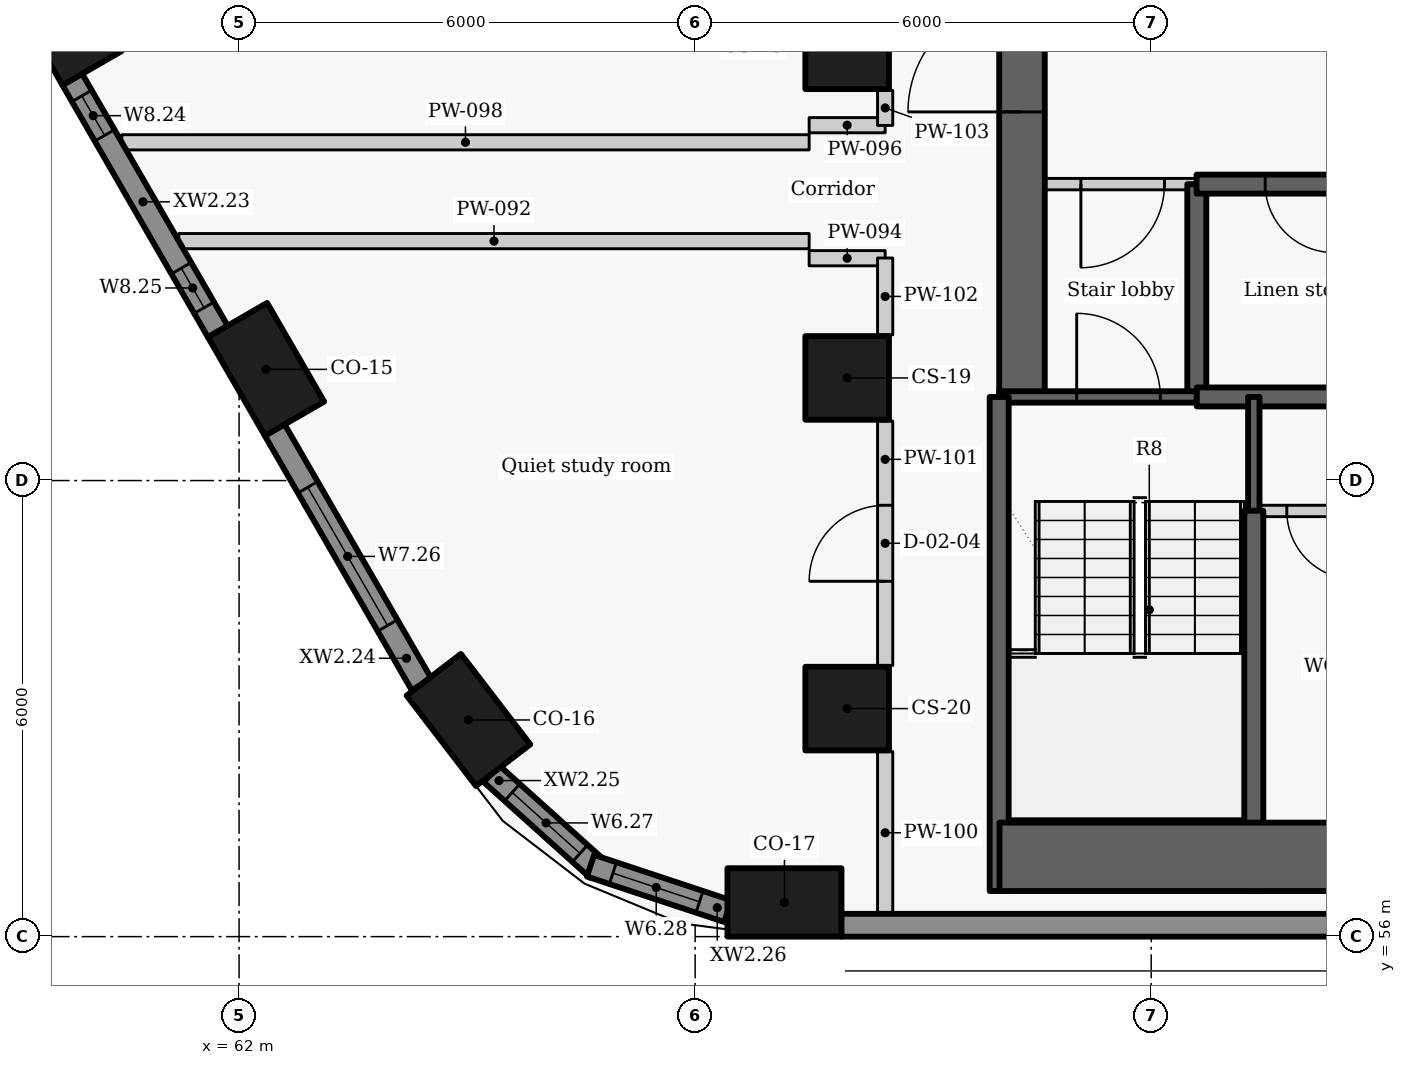
"""IFC4 building model, lengths in metres.
Left out: names, types, materials, properties, quantities, classifications, styles, units other than length and angle.
Written with IfcOpenShell. Run it as: python <this file> out.ifc"""

import sys

from ifc_helpers import new_model, si_unit, direction, frame, frame_2d, origin, origin_2d, place, context, subcontext, project, spatial, rectangle, extrude, element, fill, save


model = new_model("IFC4")
c1 = context("Model", 3, precision=1e-05, world=origin(), true_north=direction((0.0, 1.0)))
c2 = subcontext(c1, "Body", "Model", "MODEL_VIEW")
j1 = project(units=[si_unit("LENGTHUNIT", "METRE"), si_unit("PLANEANGLEUNIT", "RADIAN")], contexts=[c1])
p1 = place(None, origin())
s1 = spatial("IfcSite", under=j1, at=p1, CompositionType="ELEMENT")
p2 = place(p1, origin())
s2 = spatial("IfcBuilding", under=s1, at=p2, CompositionType="ELEMENT")
p3 = place(p2, frame((0.0, 0.0, 61.2)))
s3 = spatial("IfcBuildingStorey", under=s2, at=p3, CompositionType="ELEMENT", Elevation=61.2)
for number, where, z_axis, x_axis in (
    (1, (59.692, 68.075, 0.0), (0.0, 0.0, 1.0), (0.5, -0.866, 0.0)),
    (2, (62.354, 63.463, 0.0), (0.0, 0.0, 1.0), (0.5, -0.866, 0.0)),
    (3, (65.018, 58.851, 0.0), (0.0, 0.0, 1.0), (0.609, -0.793, 0.0)),
    (4, (69.175, 56.45, 0.0), (0.0, 0.0, 1.0), (1.0, 0.0, 0.0)),
):
    element("IfcColumn", number, at=place(p3, frame(where, z_axis=z_axis, x_axis=x_axis)), inside=s3, PredefinedType="COLUMN", context=c2, shape_type="SweptSolid", body=[
        extrude(rectangle(XDim=1.5, YDim=0.9, at=origin_2d()), origin(), (0.0, 0.0, 1.0), 3.3),
    ])
for number, where, z_axis, x_axis in (
    (5, (70.0, 67.7, 0.0), (0.0, 0.0, 1.0), (0.0, -1.0, 0.0)),
    (6, (70.0, 63.35, 0.0), (0.0, 0.0, 1.0), (0.0, -1.0, 0.0)),
    (7, (70.0, 59.0, 0.0), (0.0, 0.0, 1.0), (0.0, -1.0, 0.0)),
):
    element("IfcColumn", number, at=place(p3, frame(where, z_axis=z_axis, x_axis=x_axis)), inside=s3, PredefinedType="COLUMN", context=c2, shape_type="SweptSolid", body=[
        extrude(rectangle(XDim=1.1, YDim=1.1, at=origin_2d()), origin(), (0.0, 0.0, 1.0), 3.3),
    ])
p4 = place(p3, frame((59.805, 67.279, 0.0), z_axis=(0.0, 0.0, 1.0), x_axis=(0.500001735503, -0.866024401789, 0.0)))
e8 = element("IfcWall", 8, at=p4, inside=s3, PredefinedType="SOLIDWALL", context=c2, shape_type="SweptSolid", body=[
    extrude(rectangle(XDim=3.834, YDim=0.3, at=frame_2d((1.917, 0.0))), origin(), (0.0, 0.0, 1.0), 2.425),
])
p5 = place(p4, frame((0.253, 0.0, 0.9)))
e9 = element("IfcOpeningElement", 9, at=p5, cuts=e8, PredefinedType="OPENING", context=c2, shape_type="SweptSolid", body=[
    extrude(rectangle(XDim=0.6, YDim=1.1, at=frame_2d((0.3, 0.55))), frame((0.0, 0.16, 0.0), z_axis=(0.0, -1.0, 0.0), x_axis=(1.0, 0.0, 0.0)), (0.0, 0.0, 1.0), 0.32),
])
p6 = place(p4, frame((2.87, 0.0, 0.9)))
e10 = element("IfcOpeningElement", 10, at=p6, cuts=e8, PredefinedType="OPENING", context=c2, shape_type="SweptSolid", body=[
    extrude(rectangle(XDim=0.6, YDim=1.1, at=frame_2d((0.3, 0.55))), frame((0.0, 0.16, 0.0), z_axis=(0.0, -1.0, 0.0), x_axis=(1.0, 0.0, 0.0)), (0.0, 0.0, 1.0), 0.32),
])
p7 = place(p3, frame((62.468, 62.667, 0.0), z_axis=(0.0, 0.0, 1.0), x_axis=(0.499948341072, -0.866055227026, 0.0)))
e11 = element("IfcWall", 11, at=p7, inside=s3, PredefinedType="SOLIDWALL", context=c2, shape_type="SweptSolid", body=[
    extrude(rectangle(XDim=3.867, YDim=0.3, at=frame_2d((1.934, 0.0))), origin(), (0.0, 0.0, 1.0), 2.425),
])
p8 = place(p7, frame((0.872, 0.0, 0.9)))
e12 = element("IfcOpeningElement", 12, at=p8, cuts=e11, PredefinedType="OPENING", context=c2, shape_type="SweptSolid", body=[
    extrude(rectangle(XDim=2.1, YDim=1.1, at=frame_2d((1.05, 0.55))), frame((0.0, 0.16, 0.0), z_axis=(0.0, -1.0, 0.0), x_axis=(1.0, 0.0, 0.0)), (0.0, 0.0, 1.0), 0.32),
])
p9 = place(p3, frame((65.32, 58.143, 0.0), z_axis=(0.0, 0.0, 1.0), x_axis=(0.7435526378, -0.668677407141, 0.0)))
e13 = element("IfcWall", 13, at=p9, inside=s3, PredefinedType="SOLIDWALL", context=c2, shape_type="SweptSolid", body=[
    extrude(rectangle(XDim=1.878, YDim=0.3, at=frame_2d((0.939, 0.0))), origin(), (0.0, 0.0, 1.0), 2.425),
])
p10 = place(p9, frame((0.367, 0.0, 0.9)))
e14 = element("IfcOpeningElement", 14, at=p10, cuts=e13, PredefinedType="OPENING", context=c2, shape_type="SweptSolid", body=[
    extrude(rectangle(XDim=1.2, YDim=1.1, at=frame_2d((0.6, 0.55))), frame((0.0, 0.16, 0.0), z_axis=(0.0, -1.0, 0.0), x_axis=(1.0, 0.0, 0.0)), (0.0, 0.0, 1.0), 0.32),
])
p11 = place(p3, frame((66.624, 56.933, 0.0), z_axis=(0.0, 0.0, 1.0), x_axis=(0.949246659442, -0.314532636683, 0.0)))
e15 = element("IfcWall", 15, at=p11, inside=s3, PredefinedType="SOLIDWALL", context=c2, shape_type="SweptSolid", body=[
    extrude(rectangle(XDim=1.902, YDim=0.3, at=frame_2d((0.951, 0.0))), origin(), (0.0, 0.0, 1.0), 2.425),
])
p12 = place(p11, frame((0.31, 0.0, 0.9)))
e16 = element("IfcOpeningElement", 16, at=p12, cuts=e15, PredefinedType="OPENING", context=c2, shape_type="SweptSolid", body=[
    extrude(rectangle(XDim=1.2, YDim=1.1, at=frame_2d((0.6, 0.55))), frame((0.0, 0.16, 0.0), z_axis=(0.0, -1.0, 0.0), x_axis=(1.0, 0.0, 0.0)), (0.0, 0.0, 1.0), 0.32),
])
p13 = place(p3, frame((69.921, 56.15, 0.0), z_axis=(0.0, 0.0, 1.0), x_axis=(1.0, 0.0, 0.0)))
e17 = element("IfcWall", 17, at=p13, inside=s3, PredefinedType="SOLIDWALL", context=c2, shape_type="SweptSolid", body=[
    extrude(rectangle(XDim=19.84, YDim=0.3, at=frame_2d((9.92, 0.0))), origin(), (0.0, 0.0, 1.0), 2.425),
])
p14 = place(p3, frame((74.6, 63.1, -0.275), z_axis=(0.0, 0.0, 1.0), x_axis=(0.0, 1.0, 0.0)))
e18 = element("IfcWall", 18, at=p14, inside=s3, PredefinedType="SHEAR", context=c2, shape_type="SweptSolid", body=[
    extrude(rectangle(XDim=2.8, YDim=0.25, at=frame_2d((1.4, 0.0))), origin(), (0.0, 0.0, 1.0), 3.3),
])
p15 = place(p3, frame((72.3, 63.1, -0.275), z_axis=(0.0, 0.0, 1.0), x_axis=(0.0, 1.0, 0.0)))
e19 = element("IfcWall", 19, at=p15, inside=s3, PredefinedType="SHEAR", context=c2, shape_type="SweptSolid", body=[
    extrude(rectangle(XDim=9.1, YDim=0.6, at=frame_2d((4.55, 0.0))), origin(), (0.0, 0.0, 1.0), 3.3),
])
p16 = place(p15, frame((3.75, 0.0, 0.275)))
e20 = element("IfcOpeningElement", 20, at=p16, cuts=e19, PredefinedType="OPENING", context=c2, shape_type="SweptSolid", body=[
    extrude(rectangle(XDim=1.5, YDim=2.1, at=frame_2d((0.75, 1.05))), frame((0.0, 0.31, 0.0), z_axis=(0.0, -1.0, 0.0), x_axis=(1.0, 0.0, 0.0)), (0.0, 0.0, 1.0), 0.62),
])
p17 = place(p3, frame((74.603, 65.9, 0.0), z_axis=(0.0, 0.0, 1.0), x_axis=(-1.0, 0.0, 0.0)))
e21 = element("IfcWall", 21, at=p17, inside=s3, PredefinedType="PARTITIONING", context=c2, shape_type="SweptSolid", body=[
    extrude(rectangle(XDim=2.603, YDim=0.15, at=frame_2d((1.302, 0.0))), origin(), (0.0, 0.0, 1.0), 3.025),
])
p18 = place(p17, frame((0.428, 0.0, 0.0)))
e22 = element("IfcOpeningElement", 22, at=p18, cuts=e21, PredefinedType="OPENING", context=c2, shape_type="SweptSolid", body=[
    extrude(rectangle(XDim=1.1, YDim=2.1, at=frame_2d((0.55, 1.05))), frame((0.0, 0.085, 0.0), z_axis=(0.0, -1.0, 0.0), x_axis=(1.0, 0.0, 0.0)), (0.0, 0.0, 1.0), 0.17),
])
p19 = place(p3, frame((77.303, 65.9, -0.275), z_axis=(0.0, 0.0, 1.0), x_axis=(-1.0, 0.0, 0.0)))
e23 = element("IfcWall", 23, at=p19, inside=s3, PredefinedType="SHEAR", context=c2, shape_type="SweptSolid", body=[
    extrude(rectangle(XDim=2.706, YDim=0.25, at=frame_2d((1.353, 0.0))), origin(), (0.0, 0.0, 1.0), 3.3),
])
p20 = place(p19, frame((0.903, 0.0, 0.275)))
e24 = element("IfcOpeningElement", 24, at=p20, cuts=e23, PredefinedType="OPENING", context=c2, shape_type="SweptSolid", body=[
    extrude(rectangle(XDim=0.9, YDim=2.1, at=frame_2d((0.45, 1.05))), frame((0.0, 0.135, 0.0), z_axis=(0.0, -1.0, 0.0), x_axis=(1.0, 0.0, 0.0)), (0.0, 0.0, 1.0), 0.27),
])
p21 = place(p3, frame((72.0, 63.1, -0.275), z_axis=(0.0, 0.0, 1.0), x_axis=(1.0, 0.0, 0.0)))
e25 = element("IfcWall", 25, at=p21, inside=s3, PredefinedType="SHEAR", context=c2, shape_type="SweptSolid", body=[
    extrude(rectangle(XDim=2.6, YDim=0.15, at=frame_2d((1.3, 0.0))), origin(), (0.0, 0.0, 1.0), 3.3),
])
p22 = place(p21, frame((1.02, 0.0, 0.275)))
e26 = element("IfcOpeningElement", 26, at=p22, cuts=e25, PredefinedType="OPENING", context=c2, shape_type="SweptSolid", body=[
    extrude(rectangle(XDim=1.1, YDim=2.1, at=frame_2d((0.55, 1.05))), frame((0.0, 0.085, 0.0), z_axis=(0.0, -1.0, 0.0), x_axis=(1.0, 0.0, 0.0)), (0.0, 0.0, 1.0), 0.17),
])
p23 = place(p3, frame((74.6, 63.1, -0.275), z_axis=(0.0, 0.0, 1.0), x_axis=(1.0, 0.0, 0.0)))
e27 = element("IfcWall", 27, at=p23, inside=s3, PredefinedType="SHEAR", context=c2, shape_type="SweptSolid", body=[
    extrude(rectangle(XDim=2.7, YDim=0.25, at=frame_2d((1.35, 0.0))), origin(), (0.0, 0.0, 1.0), 3.3),
])
p24 = place(p3, frame((75.35, 61.597, -0.275), z_axis=(0.0, 0.0, 1.0), x_axis=(0.0, 1.0, 0.0)))
e28 = element("IfcWall", 28, at=p24, inside=s3, PredefinedType="SHEAR", context=c2, shape_type="SweptSolid", body=[
    extrude(rectangle(XDim=1.503, YDim=0.15, at=frame_2d((0.751, 0.0))), origin(), (0.0, 0.0, 1.0), 3.3),
])
p25 = place(p3, frame((75.35, 56.6, -0.275), z_axis=(0.0, 0.0, 1.0), x_axis=(0.0, 1.0, 0.0)))
e29 = element("IfcWall", 29, at=p25, inside=s3, PredefinedType="SHEAR", context=c2, shape_type="SweptSolid", body=[
    extrude(rectangle(XDim=5.003, YDim=0.25, at=frame_2d((2.501, 0.0))), origin(), (0.0, 0.0, 1.0), 3.3),
])
p26 = place(p3, frame((72.0, 56.6, -0.275), z_axis=(0.0, 0.0, 1.0), x_axis=(0.0, 1.0, 0.0)))
e30 = element("IfcWall", 30, at=p26, inside=s3, PredefinedType="SHEAR", context=c2, shape_type="SweptSolid", body=[
    extrude(rectangle(XDim=6.5, YDim=0.25, at=frame_2d((3.25, 0.0))), origin(), (0.0, 0.0, 1.0), 3.3),
])
p27 = place(p3, frame((80.55, 61.6, 0.0), z_axis=(0.0, 0.0, 1.0), x_axis=(-1.0, 0.0, 0.0)))
e31 = element("IfcWall", 31, at=p27, inside=s3, PredefinedType="PARTITIONING", context=c2, shape_type="SweptSolid", body=[
    extrude(rectangle(XDim=5.2, YDim=0.15, at=frame_2d((2.6, 0.0))), origin(), (0.0, 0.0, 1.0), 3.025),
])
p28 = place(p27, frame((3.866, 0.0, 0.0)))
e32 = element("IfcOpeningElement", 32, at=p28, cuts=e31, PredefinedType="OPENING", context=c2, shape_type="SweptSolid", body=[
    extrude(rectangle(XDim=0.9, YDim=2.1, at=frame_2d((0.45, 1.05))), frame((0.0, 0.085, 0.0), z_axis=(0.0, -1.0, 0.0), x_axis=(1.0, 0.0, 0.0)), (0.0, 0.0, 1.0), 0.17),
])
p29 = place(p27, frame((2.124, 0.0, 0.0)))
e33 = element("IfcOpeningElement", 33, at=p29, cuts=e31, PredefinedType="OPENING", context=c2, shape_type="SweptSolid", body=[
    extrude(rectangle(XDim=0.9, YDim=2.1, at=frame_2d((0.45, 1.05))), frame((0.0, 0.085, 0.0), z_axis=(0.0, -1.0, 0.0), x_axis=(1.0, 0.0, 0.0)), (0.0, 0.0, 1.0), 0.17),
])
p30 = place(p27, frame((0.408, 0.0, 0.0)))
e34 = element("IfcOpeningElement", 34, at=p30, cuts=e31, PredefinedType="OPENING", context=c2, shape_type="SweptSolid", body=[
    extrude(rectangle(XDim=0.9, YDim=2.1, at=frame_2d((0.45, 1.05))), frame((0.0, 0.085, 0.0), z_axis=(0.0, -1.0, 0.0), x_axis=(1.0, 0.0, 0.0)), (0.0, 0.0, 1.0), 0.17),
])
p31 = place(p3, frame((61.207, 65.15, 0.0), z_axis=(0.0, 0.0, 1.0), x_axis=(1.0, 0.0, 0.0)))
e35 = element("IfcWall", 35, at=p31, inside=s3, PredefinedType="PARTITIONING", context=c2, shape_type="SweptSolid", body=[
    extrude(rectangle(XDim=8.293, YDim=0.2, at=frame_2d((4.146, 0.0))), origin(), (0.0, 0.0, 1.0), 2.405),
])
for number, where, z_axis, x_axis in (
    (36, (69.5, 64.925, 0.0), (0.0, 0.0, 1.0), (1.0, 0.0, 0.0)),
    (37, (69.5, 66.675, 0.0), (0.0, 0.0, 1.0), (1.0, 0.0, 0.0)),
):
    element("IfcWall", number, at=place(p3, frame(where, z_axis=z_axis, x_axis=x_axis)), inside=s3, PredefinedType="PARTITIONING", context=c2, shape_type="SweptSolid", body=[
        extrude(rectangle(XDim=1.0, YDim=0.2, at=frame_2d((0.5, 0.0))), origin(), (0.0, 0.0, 1.0), 2.505),
    ])
p32 = place(p3, frame((60.457, 66.45, 0.0), z_axis=(0.0, 0.0, 1.0), x_axis=(1.0, 0.0, 0.0)))
e38 = element("IfcWall", 38, at=p32, inside=s3, PredefinedType="PARTITIONING", context=c2, shape_type="SweptSolid", body=[
    extrude(rectangle(XDim=9.043, YDim=0.2, at=frame_2d((4.521, 0.0))), origin(), (0.0, 0.0, 1.0), 2.405),
])
p33 = place(p3, frame((70.5, 56.3, 0.0), z_axis=(0.0, 0.0, 1.0), x_axis=(0.0, 1.0, 0.0)))
e39 = element("IfcWall", 39, at=p33, inside=s3, PredefinedType="PARTITIONING", context=c2, shape_type="SweptSolid", body=[
    extrude(rectangle(XDim=2.133, YDim=0.2, at=frame_2d((1.066, 0.0))), origin(), (0.0, 0.0, 1.0), 3.025),
])
p34 = place(p3, frame((70.5, 59.567, 0.0), z_axis=(0.0, 0.0, 1.0), x_axis=(0.0, 1.0, 0.0)))
e40 = element("IfcWall", 40, at=p34, inside=s3, PredefinedType="PARTITIONING", context=c2, shape_type="SweptSolid", body=[
    extrude(rectangle(XDim=3.216, YDim=0.2, at=frame_2d((1.608, 0.0))), origin(), (0.0, 0.0, 1.0), 3.025),
])
p35 = place(p34, frame((1.108, 0.0, 0.0)))
e41 = element("IfcOpeningElement", 41, at=p35, cuts=e40, PredefinedType="OPENING", context=c2, shape_type="SweptSolid", body=[
    extrude(rectangle(XDim=1.0, YDim=2.1, at=frame_2d((0.5, 1.05))), frame((0.0, 0.11, 0.0), z_axis=(0.0, -1.0, 0.0), x_axis=(1.0, 0.0, 0.0)), (0.0, 0.0, 1.0), 0.22),
])
p36 = place(p3, frame((70.5, 63.917, 0.0), z_axis=(0.0, 0.0, 1.0), x_axis=(0.0, 1.0, 0.0)))
e42 = element("IfcWall", 42, at=p36, inside=s3, PredefinedType="PARTITIONING", context=c2, shape_type="SweptSolid", body=[
    extrude(rectangle(XDim=1.011, YDim=0.2, at=frame_2d((0.505, 0.0))), origin(), (0.0, 0.0, 1.0), 3.025),
])
p37 = place(p3, frame((70.5, 66.672, 0.0), z_axis=(0.0, 0.0, 1.0), x_axis=(0.0, 1.0, 0.0)))
e43 = element("IfcWall", 43, at=p37, inside=s3, PredefinedType="PARTITIONING", context=c2, shape_type="SweptSolid", body=[
    extrude(rectangle(XDim=0.461, YDim=0.2, at=frame_2d((0.23, 0.0))), origin(), (0.0, 0.0, 1.0), 3.025),
])
p38 = place(p3, frame((72.004, 57.05, -0.275), z_axis=(0.0, 0.0, 1.0), x_axis=(1.0, 0.0, 0.0)))
e44 = element("IfcWall", 44, at=p38, inside=s3, PredefinedType="SHEAR", context=c2, shape_type="SweptSolid", body=[
    extrude(rectangle(XDim=15.992, YDim=0.9, at=frame_2d((7.996, 0.0))), origin(), (0.0, 0.0, 1.0), 3.3),
])
p39 = place(p5, origin())
e45 = element("IfcWindow", 45, at=p39, inside=s3, PartitioningType="SINGLE_PANEL", PredefinedType="WINDOW", context=c2, shape_type="SweptSolid", body=[
    extrude(rectangle(XDim=0.6, YDim=1.1, at=frame_2d((0.3, 0.55))), frame((0.0, 0.03, 0.0), z_axis=(0.0, -1.0, 0.0), x_axis=(1.0, 0.0, 0.0)), (0.0, 0.0, 1.0), 0.06),
])
fill(e9, e45)
p40 = place(p6, origin())
e46 = element("IfcWindow", 46, at=p40, inside=s3, PartitioningType="SINGLE_PANEL", PredefinedType="WINDOW", context=c2, shape_type="SweptSolid", body=[
    extrude(rectangle(XDim=0.6, YDim=1.1, at=frame_2d((0.3, 0.55))), frame((0.0, 0.03, 0.0), z_axis=(0.0, -1.0, 0.0), x_axis=(1.0, 0.0, 0.0)), (0.0, 0.0, 1.0), 0.06),
])
fill(e10, e46)
p41 = place(p8, origin())
e47 = element("IfcWindow", 47, at=p41, inside=s3, PartitioningType="SINGLE_PANEL", PredefinedType="WINDOW", context=c2, shape_type="SweptSolid", body=[
    extrude(rectangle(XDim=2.1, YDim=1.1, at=frame_2d((1.05, 0.55))), frame((0.0, 0.03, 0.0), z_axis=(0.0, -1.0, 0.0), x_axis=(1.0, 0.0, 0.0)), (0.0, 0.0, 1.0), 0.06),
])
fill(e12, e47)
p42 = place(p10, origin())
e48 = element("IfcWindow", 48, at=p42, inside=s3, PartitioningType="SINGLE_PANEL", PredefinedType="WINDOW", context=c2, shape_type="SweptSolid", body=[
    extrude(rectangle(XDim=1.2, YDim=1.1, at=frame_2d((0.6, 0.55))), frame((0.0, 0.03, 0.0), z_axis=(0.0, -1.0, 0.0), x_axis=(1.0, 0.0, 0.0)), (0.0, 0.0, 1.0), 0.06),
])
fill(e14, e48)
p43 = place(p12, origin())
e49 = element("IfcWindow", 49, at=p43, inside=s3, PartitioningType="SINGLE_PANEL", PredefinedType="WINDOW", context=c2, shape_type="SweptSolid", body=[
    extrude(rectangle(XDim=1.2, YDim=1.1, at=frame_2d((0.6, 0.55))), frame((0.0, 0.03, 0.0), z_axis=(0.0, -1.0, 0.0), x_axis=(1.0, 0.0, 0.0)), (0.0, 0.0, 1.0), 0.06),
])
fill(e16, e49)
p44 = place(p18, origin())
e50 = element("IfcDoor", 50, at=p44, inside=s3, OperationType="SINGLE_SWING_RIGHT", PredefinedType="DOOR", context=c2, shape_type="SweptSolid", body=[
    extrude(rectangle(XDim=1.1, YDim=2.1, at=frame_2d((0.55, 1.05))), frame((0.0, 0.025, 0.0), z_axis=(0.0, -1.0, 0.0), x_axis=(1.0, 0.0, 0.0)), (0.0, 0.0, 1.0), 0.05),
])
fill(e22, e50)
p45 = place(p20, origin())
e51 = element("IfcDoor", 51, at=p45, inside=s3, OperationType="SINGLE_SWING_LEFT", PredefinedType="DOOR", context=c2, shape_type="SweptSolid", body=[
    extrude(rectangle(XDim=0.9, YDim=2.1, at=frame_2d((0.45, 1.05))), frame((0.0, 0.025, 0.0), z_axis=(0.0, -1.0, 0.0), x_axis=(1.0, 0.0, 0.0)), (0.0, 0.0, 1.0), 0.05),
])
fill(e24, e51)
p46 = place(p28, origin())
e52 = element("IfcDoor", 52, at=p46, inside=s3, OperationType="SINGLE_SWING_LEFT", PredefinedType="DOOR", context=c2, shape_type="SweptSolid", body=[
    extrude(rectangle(XDim=0.9, YDim=2.1, at=frame_2d((0.45, 1.05))), frame((0.0, 0.025, 0.0), z_axis=(0.0, -1.0, 0.0), x_axis=(1.0, 0.0, 0.0)), (0.0, 0.0, 1.0), 0.05),
])
fill(e32, e52)
p47 = place(p22, origin())
e53 = element("IfcDoor", 53, at=p47, inside=s3, OperationType="SINGLE_SWING_LEFT", PredefinedType="DOOR", context=c2, shape_type="SweptSolid", body=[
    extrude(rectangle(XDim=1.1, YDim=2.1, at=frame_2d((0.55, 1.05))), frame((0.0, 0.025, 0.0), z_axis=(0.0, -1.0, 0.0), x_axis=(1.0, 0.0, 0.0)), (0.0, 0.0, 1.0), 0.05),
])
fill(e26, e53)
p48 = place(p35, origin())
e54 = element("IfcDoor", 54, at=p48, inside=s3, OperationType="SINGLE_SWING_LEFT", PredefinedType="DOOR", context=c2, shape_type="SweptSolid", body=[
    extrude(rectangle(XDim=1.0, YDim=2.1, at=frame_2d((0.5, 1.05))), frame((0.0, 0.025, 0.0), z_axis=(0.0, -1.0, 0.0), x_axis=(1.0, 0.0, 0.0)), (0.0, 0.0, 1.0), 0.05),
])
fill(e41, e54)
p49 = place(p16, origin())
e55 = element("IfcDoor", 55, at=p49, inside=s3, OperationType="DOUBLE_DOOR_SINGLE_SWING", PredefinedType="DOOR", context=c2, shape_type="SweptSolid", body=[
    extrude(rectangle(XDim=1.5, YDim=2.1, at=frame_2d((0.75, 1.05))), frame((0.0, 0.025, 0.0), z_axis=(0.0, -1.0, 0.0), x_axis=(1.0, 0.0, 0.0)), (0.0, 0.0, 1.0), 0.05),
])
fill(e20, e55)
save(model, sys.argv[1])
